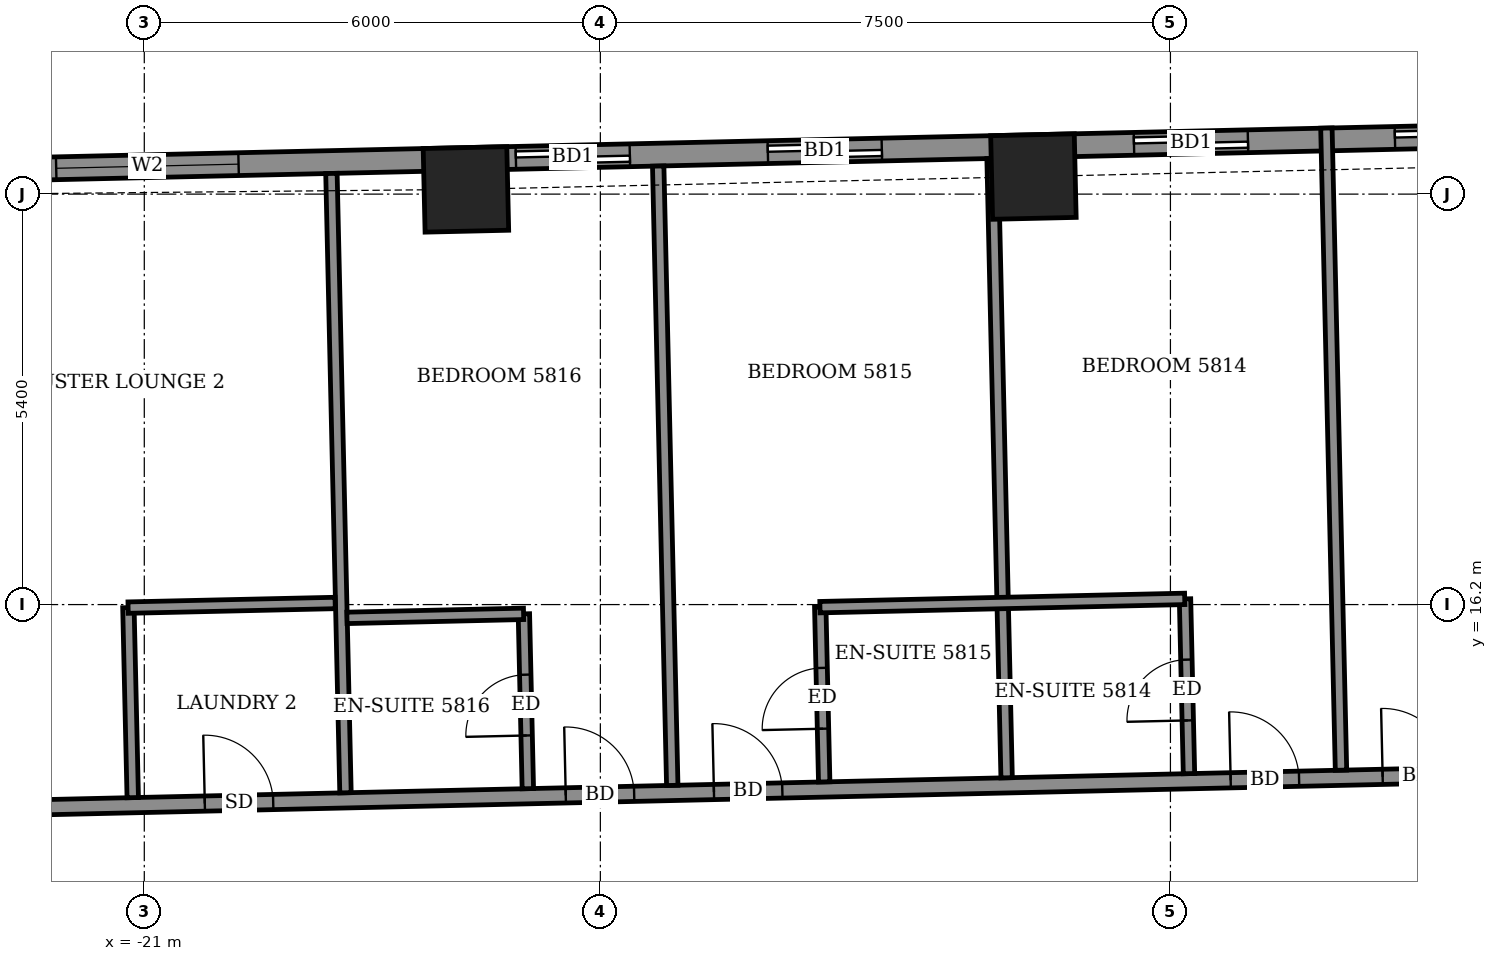
"""IFC4 building model, lengths in metres.
Left out: names, types, materials, properties, quantities, classifications, styles, units other than length and angle.
Written with IfcOpenShell. Run it as: python <this file> out.ifc"""

import sys

from ifc_helpers import new_model, si_unit, direction, frame, frame_2d, origin, origin_2d, place, context, subcontext, project, spatial, rectangle, extrude, element, fill, save


model = new_model("IFC4")
c1 = context("Model", 3, precision=1e-05, world=origin(), true_north=direction((0.0, 1.0)))
c2 = subcontext(c1, "Body", "Model", "MODEL_VIEW")
j1 = project(units=[si_unit("LENGTHUNIT", "METRE"), si_unit("PLANEANGLEUNIT", "RADIAN")], contexts=[c1])
p1 = place(None, origin())
s1 = spatial("IfcSite", under=j1, at=p1, CompositionType="ELEMENT")
p2 = place(p1, origin())
s2 = spatial("IfcBuilding", under=s1, at=p2, CompositionType="ELEMENT")
p3 = place(p2, frame((0.0, 0.0, 231.1)))
s3 = spatial("IfcBuildingStorey", under=s2, at=p3, CompositionType="ELEMENT", Elevation=231.1)
for number, where, z_axis, x_axis in (
    (1, (-9.302, 21.831, -0.55), (0.0, 0.0, 1.0), (-1.0, -0.023, 0.0)),
    (2, (-16.769, 21.662, -0.55), (0.0, 0.0, 1.0), (-1.0, -0.023, 0.0)),
):
    element("IfcColumn", number, at=place(p3, frame(where, z_axis=z_axis, x_axis=x_axis)), inside=s3, PredefinedType="COLUMN", context=c2, shape_type="SweptSolid", body=[
        extrude(rectangle(XDim=1.1, YDim=1.1, at=origin_2d()), origin(), (0.0, 0.0, 1.0), 3.6),
    ])
p4 = place(p3, frame((20.403, 22.905, 0.0), z_axis=(0.0, 0.0, 1.0), x_axis=(-0.99974298964, -0.022670568288, 0.0)))
e3 = element("IfcWall", 3, at=p4, inside=s3, PredefinedType="SOLIDWALL", context=c2, shape_type="SweptSolid", body=[
    extrude(rectangle(XDim=44.509, YDim=0.3, at=frame_2d((22.254, 0.0))), origin(), (0.0, 0.0, 1.0), 2.55),
])
p5 = place(p4, frame((1.62, 0.0, 0.0)))
e4 = element("IfcOpeningElement", 4, at=p5, cuts=e3, PredefinedType="OPENING", context=c2, shape_type="SweptSolid", body=[
    extrude(rectangle(XDim=1.5, YDim=2.4, at=frame_2d((0.75, 1.2))), frame((0.0, 0.16, 0.0), z_axis=(0.0, -1.0, 0.0), x_axis=(1.0, 0.0, 0.0)), (0.0, 0.0, 1.0), 0.32),
])
p6 = place(p4, frame((4.813, 0.0, 0.0)))
e5 = element("IfcOpeningElement", 5, at=p6, cuts=e3, PredefinedType="OPENING", context=c2, shape_type="SweptSolid", body=[
    extrude(rectangle(XDim=1.5, YDim=2.4, at=frame_2d((0.75, 1.2))), frame((0.0, 0.16, 0.0), z_axis=(0.0, -1.0, 0.0), x_axis=(1.0, 0.0, 0.0)), (0.0, 0.0, 1.0), 0.32),
])
p7 = place(p4, frame((9.833, 0.0, 0.0)))
e6 = element("IfcOpeningElement", 6, at=p7, cuts=e3, PredefinedType="OPENING", context=c2, shape_type="SweptSolid", body=[
    extrude(rectangle(XDim=1.5, YDim=2.4, at=frame_2d((0.75, 1.2))), frame((0.0, 0.16, 0.0), z_axis=(0.0, -1.0, 0.0), x_axis=(1.0, 0.0, 0.0)), (0.0, 0.0, 1.0), 0.32),
])
p8 = place(p4, frame((15.522, 0.0, 0.0)))
e7 = element("IfcOpeningElement", 7, at=p8, cuts=e3, PredefinedType="OPENING", context=c2, shape_type="SweptSolid", body=[
    extrude(rectangle(XDim=1.2, YDim=2.4, at=frame_2d((0.6, 1.2))), frame((0.0, 0.16, 0.0), z_axis=(0.0, -1.0, 0.0), x_axis=(1.0, 0.0, 0.0)), (0.0, 0.0, 1.0), 0.32),
])
p9 = place(p4, frame((18.558, 0.0, 0.0)))
e8 = element("IfcOpeningElement", 8, at=p9, cuts=e3, PredefinedType="OPENING", context=c2, shape_type="SweptSolid", body=[
    extrude(rectangle(XDim=1.5, YDim=2.4, at=frame_2d((0.75, 1.2))), frame((0.0, 0.16, 0.0), z_axis=(0.0, -1.0, 0.0), x_axis=(1.0, 0.0, 0.0)), (0.0, 0.0, 1.0), 0.32),
])
p10 = place(p4, frame((23.456, 0.0, 0.0)))
e9 = element("IfcOpeningElement", 9, at=p10, cuts=e3, PredefinedType="OPENING", context=c2, shape_type="SweptSolid", body=[
    extrude(rectangle(XDim=1.5, YDim=2.4, at=frame_2d((0.75, 1.2))), frame((0.0, 0.16, 0.0), z_axis=(0.0, -1.0, 0.0), x_axis=(1.0, 0.0, 0.0)), (0.0, 0.0, 1.0), 0.32),
])
p11 = place(p4, frame((26.89, 0.0, 0.0)))
e10 = element("IfcOpeningElement", 10, at=p11, cuts=e3, PredefinedType="OPENING", context=c2, shape_type="SweptSolid", body=[
    extrude(rectangle(XDim=1.5, YDim=2.4, at=frame_2d((0.75, 1.2))), frame((0.0, 0.16, 0.0), z_axis=(0.0, -1.0, 0.0), x_axis=(1.0, 0.0, 0.0)), (0.0, 0.0, 1.0), 0.32),
])
p12 = place(p4, frame((31.708, 0.0, 0.0)))
e11 = element("IfcOpeningElement", 11, at=p12, cuts=e3, PredefinedType="OPENING", context=c2, shape_type="SweptSolid", body=[
    extrude(rectangle(XDim=1.5, YDim=2.4, at=frame_2d((0.75, 1.2))), frame((0.0, 0.16, 0.0), z_axis=(0.0, -1.0, 0.0), x_axis=(1.0, 0.0, 0.0)), (0.0, 0.0, 1.0), 0.32),
])
p13 = place(p4, frame((35.024, 0.0, 0.0)))
e12 = element("IfcOpeningElement", 12, at=p13, cuts=e3, PredefinedType="OPENING", context=c2, shape_type="SweptSolid", body=[
    extrude(rectangle(XDim=1.5, YDim=2.4, at=frame_2d((0.75, 1.2))), frame((0.0, 0.16, 0.0), z_axis=(0.0, -1.0, 0.0), x_axis=(1.0, 0.0, 0.0)), (0.0, 0.0, 1.0), 0.32),
])
p14 = place(p4, frame((40.173, 0.0, 0.9)))
e13 = element("IfcOpeningElement", 13, at=p14, cuts=e3, PredefinedType="OPENING", context=c2, shape_type="SweptSolid", body=[
    extrude(rectangle(XDim=2.4, YDim=1.5, at=frame_2d((1.2, 0.75))), frame((0.0, 0.16, 0.0), z_axis=(0.0, -1.0, 0.0), x_axis=(1.0, 0.0, 0.0)), (0.0, 0.0, 1.0), 0.32),
])
p15 = place(p3, frame((-27.652, 13.413, 0.0), z_axis=(0.0, 0.0, 1.0), x_axis=(0.999742610679, 0.022687273792, 0.0)))
e14 = element("IfcWall", 14, at=p15, inside=s3, PredefinedType="PARTITIONING", context=c2, shape_type="SweptSolid", body=[
    extrude(rectangle(XDim=50.857, YDim=0.2, at=frame_2d((25.429, 0.0))), origin(), (0.0, 0.0, 1.0), 3.05),
])
p16 = place(p15, frame((49.179, 0.0, 0.0)))
e15 = element("IfcOpeningElement", 15, at=p16, cuts=e14, PredefinedType="OPENING", context=c2, shape_type="SweptSolid", body=[
    extrude(rectangle(XDim=1.0, YDim=2.1, at=frame_2d((0.5, 1.05))), frame((0.0, 0.11, 0.0), z_axis=(0.0, -1.0, 0.0), x_axis=(1.0, 0.0, 0.0)), (0.0, 0.0, 1.0), 0.22),
])
p17 = place(p15, frame((44.9, 0.0, 0.0)))
e16 = element("IfcOpeningElement", 16, at=p17, cuts=e14, PredefinedType="OPENING", context=c2, shape_type="SweptSolid", body=[
    extrude(rectangle(XDim=0.9, YDim=2.1, at=frame_2d((0.45, 1.05))), frame((0.0, 0.11, 0.0), z_axis=(0.0, -1.0, 0.0), x_axis=(1.0, 0.0, 0.0)), (0.0, 0.0, 1.0), 0.22),
])
p18 = place(p15, frame((40.375, 0.0, 0.0)))
e17 = element("IfcOpeningElement", 17, at=p18, cuts=e14, PredefinedType="OPENING", context=c2, shape_type="SweptSolid", body=[
    extrude(rectangle(XDim=0.9, YDim=2.1, at=frame_2d((0.45, 1.05))), frame((0.0, 0.11, 0.0), z_axis=(0.0, -1.0, 0.0), x_axis=(1.0, 0.0, 0.0)), (0.0, 0.0, 1.0), 0.22),
])
p19 = place(p15, frame((38.425, 0.0, 0.0)))
e18 = element("IfcOpeningElement", 18, at=p19, cuts=e14, PredefinedType="OPENING", context=c2, shape_type="SweptSolid", body=[
    extrude(rectangle(XDim=0.9, YDim=2.1, at=frame_2d((0.45, 1.05))), frame((0.0, 0.11, 0.0), z_axis=(0.0, -1.0, 0.0), x_axis=(1.0, 0.0, 0.0)), (0.0, 0.0, 1.0), 0.22),
])
p20 = place(p15, frame((31.625, 0.0, 0.0)))
e19 = element("IfcOpeningElement", 19, at=p20, cuts=e14, PredefinedType="OPENING", context=c2, shape_type="SweptSolid", body=[
    extrude(rectangle(XDim=0.9, YDim=2.1, at=frame_2d((0.45, 1.05))), frame((0.0, 0.11, 0.0), z_axis=(0.0, -1.0, 0.0), x_axis=(1.0, 0.0, 0.0)), (0.0, 0.0, 1.0), 0.22),
])
p21 = place(p15, frame((29.7, 0.0, 0.0)))
e20 = element("IfcOpeningElement", 20, at=p21, cuts=e14, PredefinedType="OPENING", context=c2, shape_type="SweptSolid", body=[
    extrude(rectangle(XDim=0.9, YDim=2.1, at=frame_2d((0.45, 1.05))), frame((0.0, 0.11, 0.0), z_axis=(0.0, -1.0, 0.0), x_axis=(1.0, 0.0, 0.0)), (0.0, 0.0, 1.0), 0.22),
])
p22 = place(p15, frame((22.95, 0.0, 0.0)))
e21 = element("IfcOpeningElement", 21, at=p22, cuts=e14, PredefinedType="OPENING", context=c2, shape_type="SweptSolid", body=[
    extrude(rectangle(XDim=0.9, YDim=2.1, at=frame_2d((0.45, 1.05))), frame((0.0, 0.11, 0.0), z_axis=(0.0, -1.0, 0.0), x_axis=(1.0, 0.0, 0.0)), (0.0, 0.0, 1.0), 0.22),
])
p23 = place(p15, frame((20.95, 0.0, 0.0)))
e22 = element("IfcOpeningElement", 22, at=p23, cuts=e14, PredefinedType="OPENING", context=c2, shape_type="SweptSolid", body=[
    extrude(rectangle(XDim=0.9, YDim=2.1, at=frame_2d((0.45, 1.05))), frame((0.0, 0.11, 0.0), z_axis=(0.0, -1.0, 0.0), x_axis=(1.0, 0.0, 0.0)), (0.0, 0.0, 1.0), 0.22),
])
p24 = place(p15, frame((14.15, 0.0, 0.0)))
e23 = element("IfcOpeningElement", 23, at=p24, cuts=e14, PredefinedType="OPENING", context=c2, shape_type="SweptSolid", body=[
    extrude(rectangle(XDim=0.9, YDim=2.1, at=frame_2d((0.45, 1.05))), frame((0.0, 0.11, 0.0), z_axis=(0.0, -1.0, 0.0), x_axis=(1.0, 0.0, 0.0)), (0.0, 0.0, 1.0), 0.22),
])
p25 = place(p15, frame((12.2, 0.0, 0.0)))
e24 = element("IfcOpeningElement", 24, at=p25, cuts=e14, PredefinedType="OPENING", context=c2, shape_type="SweptSolid", body=[
    extrude(rectangle(XDim=0.9, YDim=2.1, at=frame_2d((0.45, 1.05))), frame((0.0, 0.11, 0.0), z_axis=(0.0, -1.0, 0.0), x_axis=(1.0, 0.0, 0.0)), (0.0, 0.0, 1.0), 0.22),
])
p26 = place(p15, frame((2.05, 0.0, 0.0)))
e25 = element("IfcOpeningElement", 25, at=p26, cuts=e14, PredefinedType="OPENING", context=c2, shape_type="SweptSolid", body=[
    extrude(rectangle(XDim=1.0, YDim=2.1, at=frame_2d((0.5, 1.05))), frame((0.0, 0.11, 0.0), z_axis=(0.0, -1.0, 0.0), x_axis=(1.0, 0.0, 0.0)), (0.0, 0.0, 1.0), 0.22),
])
p27 = place(p15, frame((7.45, 0.0, 0.0)))
e26 = element("IfcOpeningElement", 26, at=p27, cuts=e14, PredefinedType="OPENING", context=c2, shape_type="SweptSolid", body=[
    extrude(rectangle(XDim=0.9, YDim=2.1, at=frame_2d((0.45, 1.05))), frame((0.0, 0.11, 0.0), z_axis=(0.0, -1.0, 0.0), x_axis=(1.0, 0.0, 0.0)), (0.0, 0.0, 1.0), 0.22),
])
p28 = place(p3, frame((-21.152, 13.66, 0.0), z_axis=(0.0, 0.0, 1.0), x_axis=(-0.02274801823, 0.999741230352, 0.0)))
e27 = element("IfcWall", 27, at=p28, inside=s3, PredefinedType="PARTITIONING", context=c2, shape_type="SweptSolid", body=[
    extrude(rectangle(XDim=2.501, YDim=0.15, at=frame_2d((1.25, 0.0))), origin(), (0.0, 0.0, 1.0), 3.05),
])
p29 = place(p3, frame((-18.353, 13.724, 0.0), z_axis=(0.0, 0.0, 1.0), x_axis=(-0.022706435224, 0.999742175663, 0.0)))
e28 = element("IfcWall", 28, at=p29, inside=s3, PredefinedType="PARTITIONING", context=c2, shape_type="SweptSolid", body=[
    extrude(rectangle(XDim=8.15, YDim=0.15, at=frame_2d((4.075, 0.0))), origin(), (0.0, 0.0, 1.0), 2.55),
])
p30 = place(p3, frame((-15.954, 13.778, 0.0), z_axis=(0.0, 0.0, 1.0), x_axis=(-0.022605686808, 0.999744458811, 0.0)))
e29 = element("IfcWall", 29, at=p30, inside=s3, PredefinedType="PARTITIONING", context=c2, shape_type="SweptSolid", body=[
    extrude(rectangle(XDim=2.3, YDim=0.15, at=frame_2d((1.15, 0.0))), origin(), (0.0, 0.0, 1.0), 3.05),
])
p31 = place(p30, frame((0.7, 0.0, 0.0)))
e30 = element("IfcOpeningElement", 30, at=p31, cuts=e29, PredefinedType="OPENING", context=c2, shape_type="SweptSolid", body=[
    extrude(rectangle(XDim=0.8, YDim=2.1, at=frame_2d((0.4, 1.05))), frame((0.0, 0.085, 0.0), z_axis=(0.0, -1.0, 0.0), x_axis=(1.0, 0.0, 0.0)), (0.0, 0.0, 1.0), 0.17),
])
p32 = place(p3, frame((-14.054, 13.821, 0.0), z_axis=(0.0, 0.0, 1.0), x_axis=(-0.022706435224, 0.999742175663, 0.0)))
e31 = element("IfcWall", 31, at=p32, inside=s3, PredefinedType="PARTITIONING", context=c2, shape_type="SweptSolid", body=[
    extrude(rectangle(XDim=8.15, YDim=0.15, at=frame_2d((4.075, 0.0))), origin(), (0.0, 0.0, 1.0), 2.5),
])
p33 = place(p3, frame((-12.055, 13.867, 0.0), z_axis=(0.0, 0.0, 1.0), x_axis=(-0.022612884682, 0.999744296031, 0.0)))
e32 = element("IfcWall", 32, at=p33, inside=s3, PredefinedType="PARTITIONING", context=c2, shape_type="SweptSolid", body=[
    extrude(rectangle(XDim=2.3, YDim=0.15, at=frame_2d((1.15, 0.0))), origin(), (0.0, 0.0, 1.0), 3.05),
])
p34 = place(p33, frame((0.7, 0.0, 0.0)))
e33 = element("IfcOpeningElement", 33, at=p34, cuts=e32, PredefinedType="OPENING", context=c2, shape_type="SweptSolid", body=[
    extrude(rectangle(XDim=0.8, YDim=2.1, at=frame_2d((0.4, 1.05))), frame((0.0, 0.085, 0.0), z_axis=(0.0, -1.0, 0.0), x_axis=(1.0, 0.0, 0.0)), (0.0, 0.0, 1.0), 0.17),
])
p35 = place(p3, frame((-9.655, 13.921, 0.0), z_axis=(0.0, 0.0, 1.0), x_axis=(-0.022705755232, 0.999742191107, 0.0)))
e34 = element("IfcWall", 34, at=p35, inside=s3, PredefinedType="PARTITIONING", context=c2, shape_type="SweptSolid", body=[
    extrude(rectangle(XDim=8.15, YDim=0.15, at=frame_2d((4.075, 0.0))), origin(), (0.0, 0.0, 1.0), 2.5),
])
p36 = place(p3, frame((-7.256, 13.976, 0.0), z_axis=(0.0, 0.0, 1.0), x_axis=(-0.022615284993, 0.999744241736, 0.0)))
e35 = element("IfcWall", 35, at=p36, inside=s3, PredefinedType="PARTITIONING", context=c2, shape_type="SweptSolid", body=[
    extrude(rectangle(XDim=2.299, YDim=0.15, at=frame_2d((1.15, 0.0))), origin(), (0.0, 0.0, 1.0), 3.05),
])
p37 = place(p36, frame((0.7, 0.0, 0.0)))
e36 = element("IfcOpeningElement", 36, at=p37, cuts=e35, PredefinedType="OPENING", context=c2, shape_type="SweptSolid", body=[
    extrude(rectangle(XDim=0.8, YDim=2.1, at=frame_2d((0.4, 1.05))), frame((0.0, 0.085, 0.0), z_axis=(0.0, -1.0, 0.0), x_axis=(1.0, 0.0, 0.0)), (0.0, 0.0, 1.0), 0.17),
])
p38 = place(p3, frame((-5.256, 14.021, 0.0), z_axis=(0.0, 0.0, 1.0), x_axis=(-0.022708935798, 0.999742118866, 0.0)))
e37 = element("IfcWall", 37, at=p38, inside=s3, PredefinedType="PARTITIONING", context=c2, shape_type="SweptSolid", body=[
    extrude(rectangle(XDim=8.45, YDim=0.15, at=frame_2d((4.225, 0.0))), origin(), (0.0, 0.0, 1.0), 2.5),
])
p39 = place(p3, frame((-18.334, 16.025, 0.0), z_axis=(0.0, 0.0, 1.0), x_axis=(0.999740260747, 0.02279059109, 0.0)))
e38 = element("IfcWall", 38, at=p39, inside=s3, PredefinedType="PARTITIONING", context=c2, shape_type="SweptSolid", body=[
    extrude(rectangle(XDim=2.324, YDim=0.15, at=frame_2d((1.162, 0.0))), origin(), (0.0, 0.0, 1.0), 3.05),
])
p40 = place(p3, frame((-12.111, 16.166, 0.0), z_axis=(0.0, 0.0, 1.0), x_axis=(0.999742701292, 0.022683280499, 0.0)))
e39 = element("IfcWall", 39, at=p40, inside=s3, PredefinedType="PARTITIONING", context=c2, shape_type="SweptSolid", body=[
    extrude(rectangle(XDim=4.8, YDim=0.15, at=frame_2d((2.4, 0.0))), origin(), (0.0, 0.0, 1.0), 3.05),
])
p41 = place(p3, frame((-21.213, 16.16, 0.0), z_axis=(0.0, 0.0, 1.0), x_axis=(0.999749047428, 0.022401833993, 0.0)))
e40 = element("IfcWall", 40, at=p41, inside=s3, PredefinedType="PARTITIONING", context=c2, shape_type="SweptSolid", body=[
    extrude(rectangle(XDim=2.725, YDim=0.15, at=frame_2d((1.362, 0.0))), origin(), (0.0, 0.0, 1.0), 3.05),
])
p42 = place(p10, origin())
e41 = element("IfcDoor", 41, at=p42, inside=s3, OperationType="SLIDING_TO_LEFT", PredefinedType="DOOR", context=c2, shape_type="SweptSolid", body=[
    extrude(rectangle(XDim=1.5, YDim=2.4, at=frame_2d((0.75, 1.2))), frame((0.0, 0.025, 0.0), z_axis=(0.0, -1.0, 0.0), x_axis=(1.0, 0.0, 0.0)), (0.0, 0.0, 1.0), 0.05),
])
fill(e9, e41)
p43 = place(p11, origin())
e42 = element("IfcDoor", 42, at=p43, inside=s3, OperationType="SLIDING_TO_LEFT", PredefinedType="DOOR", context=c2, shape_type="SweptSolid", body=[
    extrude(rectangle(XDim=1.5, YDim=2.4, at=frame_2d((0.75, 1.2))), frame((0.0, 0.025, 0.0), z_axis=(0.0, -1.0, 0.0), x_axis=(1.0, 0.0, 0.0)), (0.0, 0.0, 1.0), 0.05),
])
fill(e10, e42)
p44 = place(p12, origin())
e43 = element("IfcDoor", 43, at=p44, inside=s3, OperationType="SLIDING_TO_LEFT", PredefinedType="DOOR", context=c2, shape_type="SweptSolid", body=[
    extrude(rectangle(XDim=1.5, YDim=2.4, at=frame_2d((0.75, 1.2))), frame((0.0, 0.025, 0.0), z_axis=(0.0, -1.0, 0.0), x_axis=(1.0, 0.0, 0.0)), (0.0, 0.0, 1.0), 0.05),
])
fill(e11, e43)
p45 = place(p13, origin())
e44 = element("IfcDoor", 44, at=p45, inside=s3, OperationType="SLIDING_TO_LEFT", PredefinedType="DOOR", context=c2, shape_type="SweptSolid", body=[
    extrude(rectangle(XDim=1.5, YDim=2.4, at=frame_2d((0.75, 1.2))), frame((0.0, 0.025, 0.0), z_axis=(0.0, -1.0, 0.0), x_axis=(1.0, 0.0, 0.0)), (0.0, 0.0, 1.0), 0.05),
])
fill(e12, e44)
p46 = place(p14, origin())
e45 = element("IfcWindow", 45, at=p46, inside=s3, PartitioningType="DOUBLE_PANEL_VERTICAL", PredefinedType="WINDOW", context=c2, shape_type="SweptSolid", body=[
    extrude(rectangle(XDim=2.4, YDim=1.5, at=frame_2d((1.2, 0.75))), frame((0.0, 0.03, 0.0), z_axis=(0.0, -1.0, 0.0), x_axis=(1.0, 0.0, 0.0)), (0.0, 0.0, 1.0), 0.06),
])
fill(e13, e45)
p47 = place(p22, origin())
e46 = element("IfcDoor", 46, at=p47, inside=s3, OperationType="SINGLE_SWING_LEFT", PredefinedType="DOOR", context=c2, shape_type="SweptSolid", body=[
    extrude(rectangle(XDim=0.9, YDim=2.1, at=frame_2d((0.45, 1.05))), frame((0.0, 0.025, 0.0), z_axis=(0.0, -1.0, 0.0), x_axis=(1.0, 0.0, 0.0)), (0.0, 0.0, 1.0), 0.05),
])
fill(e21, e46)
p48 = place(p23, origin())
e47 = element("IfcDoor", 47, at=p48, inside=s3, OperationType="SINGLE_SWING_RIGHT", PredefinedType="DOOR", context=c2, shape_type="SweptSolid", body=[
    extrude(rectangle(XDim=0.9, YDim=2.1, at=frame_2d((0.45, 1.05))), frame((0.0, 0.025, 0.0), z_axis=(0.0, -1.0, 0.0), x_axis=(1.0, 0.0, 0.0)), (0.0, 0.0, 1.0), 0.05),
])
fill(e22, e47)
p49 = place(p37, origin())
e48 = element("IfcDoor", 48, at=p49, inside=s3, OperationType="SINGLE_SWING_RIGHT", PredefinedType="DOOR", context=c2, shape_type="SweptSolid", body=[
    extrude(rectangle(XDim=0.8, YDim=2.1, at=frame_2d((0.4, 1.05))), frame((0.0, 0.025, 0.0), z_axis=(0.0, -1.0, 0.0), x_axis=(1.0, 0.0, 0.0)), (0.0, 0.0, 1.0), 0.05),
])
fill(e36, e48)
p50 = place(p24, origin())
e49 = element("IfcDoor", 49, at=p50, inside=s3, OperationType="SINGLE_SWING_LEFT", PredefinedType="DOOR", context=c2, shape_type="SweptSolid", body=[
    extrude(rectangle(XDim=0.9, YDim=2.1, at=frame_2d((0.45, 1.05))), frame((0.0, 0.025, 0.0), z_axis=(0.0, -1.0, 0.0), x_axis=(1.0, 0.0, 0.0)), (0.0, 0.0, 1.0), 0.05),
])
fill(e23, e49)
p51 = place(p34, origin())
e50 = element("IfcDoor", 50, at=p51, inside=s3, OperationType="SINGLE_SWING_LEFT", PredefinedType="DOOR", context=c2, shape_type="SweptSolid", body=[
    extrude(rectangle(XDim=0.8, YDim=2.1, at=frame_2d((0.4, 1.05))), frame((0.0, 0.025, 0.0), z_axis=(0.0, -1.0, 0.0), x_axis=(1.0, 0.0, 0.0)), (0.0, 0.0, 1.0), 0.05),
])
fill(e33, e50)
p52 = place(p25, origin())
e51 = element("IfcDoor", 51, at=p52, inside=s3, OperationType="SINGLE_SWING_RIGHT", PredefinedType="DOOR", context=c2, shape_type="SweptSolid", body=[
    extrude(rectangle(XDim=0.9, YDim=2.1, at=frame_2d((0.45, 1.05))), frame((0.0, 0.025, 0.0), z_axis=(0.0, -1.0, 0.0), x_axis=(1.0, 0.0, 0.0)), (0.0, 0.0, 1.0), 0.05),
])
fill(e24, e51)
p53 = place(p31, origin())
e52 = element("IfcDoor", 52, at=p53, inside=s3, OperationType="SINGLE_SWING_RIGHT", PredefinedType="DOOR", context=c2, shape_type="SweptSolid", body=[
    extrude(rectangle(XDim=0.8, YDim=2.1, at=frame_2d((0.4, 1.05))), frame((0.0, 0.025, 0.0), z_axis=(0.0, -1.0, 0.0), x_axis=(1.0, 0.0, 0.0)), (0.0, 0.0, 1.0), 0.05),
])
fill(e30, e52)
p54 = place(p27, origin())
e53 = element("IfcDoor", 53, at=p54, inside=s3, OperationType="SINGLE_SWING_LEFT", PredefinedType="DOOR", context=c2, shape_type="SweptSolid", body=[
    extrude(rectangle(XDim=0.9, YDim=2.1, at=frame_2d((0.45, 1.05))), frame((0.0, 0.025, 0.0), z_axis=(0.0, -1.0, 0.0), x_axis=(1.0, 0.0, 0.0)), (0.0, 0.0, 1.0), 0.05),
])
fill(e26, e53)
save(model, sys.argv[1])
